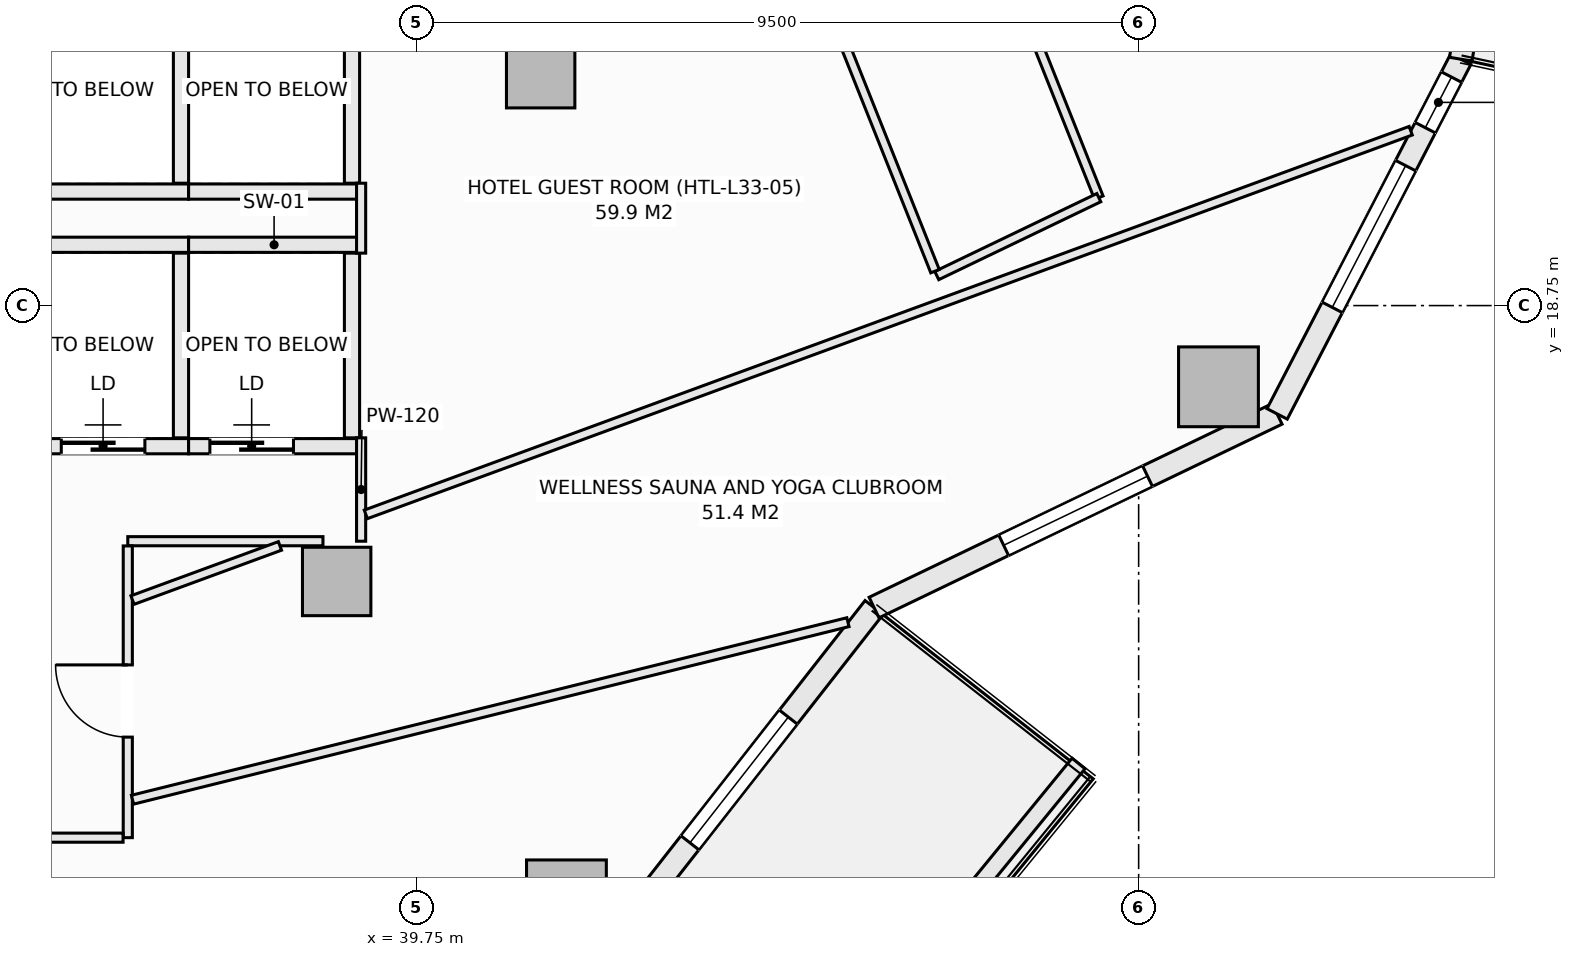
"""IFC4 building model, lengths in metres.
Left out: names, types, materials, properties, quantities, classifications, styles, units other than length and angle.
Written with IfcOpenShell. Run it as: python <this file> out.ifc"""

import sys

from ifc_helpers import new_model, si_unit, direction, frame, frame_2d, origin, origin_2d, place, context, subcontext, project, spatial, rectangle, extrude, element, fill, save


model = new_model("IFC4")
c1 = context("Model", 3, precision=1e-05, world=origin(), true_north=direction((0.0, 1.0)))
c2 = subcontext(c1, "Body", "Model", "MODEL_VIEW")
j1 = project(units=[si_unit("LENGTHUNIT", "METRE"), si_unit("PLANEANGLEUNIT", "RADIAN")], contexts=[c1])
p1 = place(None, origin())
s1 = spatial("IfcSite", under=j1, at=p1, CompositionType="ELEMENT")
p2 = place(p1, origin())
s2 = spatial("IfcBuilding", under=s1, at=p2, CompositionType="ELEMENT")
p3 = place(p2, frame((0.0, 0.0, 132.5)))
s3 = spatial("IfcBuildingStorey", under=s2, at=p3, CompositionType="ELEMENT", Elevation=132.5)
for number, where, z_axis, x_axis in (
    (1, (41.721, 10.932, -0.27), (0.0, 0.0, 1.0), (1.0, 0.0, 0.0)),
    (2, (50.3, 17.681, -0.27), (0.0, 0.0, 1.0), (1.0, 0.0, 0.0)),
):
    element("IfcColumn", number, at=place(p3, frame(where, z_axis=z_axis, x_axis=x_axis)), inside=s3, PredefinedType="COLUMN", context=c2, shape_type="SweptSolid", body=[
        extrude(rectangle(XDim=1.05, YDim=1.05, at=origin_2d()), origin(), (0.0, 0.0, 1.0), 3.4),
    ])
for number, where, z_axis, x_axis in (
    (3, (38.698, 15.121, -0.27), (0.0, 0.0, 1.0), (1.0, 0.0, 0.0)),
    (4, (41.382, 21.801, -0.27), (0.0, 0.0, 1.0), (1.0, 0.0, 0.0)),
):
    element("IfcColumn", number, at=place(p3, frame(where, z_axis=z_axis, x_axis=x_axis)), inside=s3, PredefinedType="COLUMN", context=c2, shape_type="SweptSolid", body=[
        extrude(rectangle(XDim=0.9, YDim=0.9, at=origin_2d()), origin(), (0.0, 0.0, 1.0), 3.4),
    ])
p4 = place(p3, frame((42.219, 10.242, 0.0), z_axis=(0.0, 0.0, 1.0), x_axis=(0.616435134162, 0.787405693001, 0.0)))
e5 = element("IfcWall", 5, at=p4, inside=s3, PredefinedType="SOLIDWALL", context=c2, shape_type="SweptSolid", body=[
    extrude(rectangle(XDim=5.759, YDim=0.3, at=frame_2d((2.879, 0.0))), origin(), (0.0, 0.0, 1.0), 2.653),
])
p5 = place(p4, frame((1.829, 0.0, 0.74)))
e6 = element("IfcOpeningElement", 6, at=p5, cuts=e5, PredefinedType="OPENING", context=c2, shape_type="SweptSolid", body=[
    extrude(rectangle(XDim=2.1, YDim=1.7, at=frame_2d((1.05, 0.85))), frame((0.0, 0.16, 0.0), z_axis=(0.0, -1.0, 0.0), x_axis=(1.0, 0.0, 0.0)), (0.0, 0.0, 1.0), 0.32),
])
p6 = place(p3, frame((45.769, 14.777, 0.0), z_axis=(0.0, 0.0, 1.0), x_axis=(0.901370184739, 0.433049408339, 0.0)))
e7 = element("IfcWall", 7, at=p6, inside=s3, PredefinedType="SOLIDWALL", context=c2, shape_type="SweptSolid", body=[
    extrude(rectangle(XDim=5.884, YDim=0.3, at=frame_2d((2.942, 0.0))), origin(), (0.0, 0.0, 1.0), 2.653),
])
p7 = place(p6, frame((1.892, 0.0, 0.74)))
e8 = element("IfcOpeningElement", 8, at=p7, cuts=e7, PredefinedType="OPENING", context=c2, shape_type="SweptSolid", body=[
    extrude(rectangle(XDim=2.1, YDim=1.7, at=frame_2d((1.05, 0.85))), frame((0.0, 0.16, 0.0), z_axis=(0.0, -1.0, 0.0), x_axis=(1.0, 0.0, 0.0)), (0.0, 0.0, 1.0), 0.32),
])
p8 = place(p3, frame((51.072, 17.325, 0.0), z_axis=(0.0, 0.0, 1.0), x_axis=(0.459767899643, 0.888039119892, 0.0)))
e9 = element("IfcWall", 9, at=p8, inside=s3, PredefinedType="SOLIDWALL", context=c2, shape_type="SweptSolid", body=[
    extrude(rectangle(XDim=5.255, YDim=0.3, at=frame_2d((2.628, 0.0))), origin(), (0.0, 0.0, 1.0), 2.653),
])
p9 = place(p8, frame((1.578, 0.0, 0.74)))
e10 = element("IfcOpeningElement", 10, at=p9, cuts=e9, PredefinedType="OPENING", context=c2, shape_type="SweptSolid", body=[
    extrude(rectangle(XDim=2.1, YDim=1.7, at=frame_2d((1.05, 0.85))), frame((0.0, 0.16, 0.0), z_axis=(0.0, -1.0, 0.0), x_axis=(1.0, 0.0, 0.0)), (0.0, 0.0, 1.0), 0.32),
])
p10 = place(p8, frame((4.24, 0.0, 0.72)))
e11 = element("IfcOpeningElement", 11, at=p10, cuts=e9, PredefinedType="OPENING", context=c2, shape_type="SweptSolid", body=[
    extrude(rectangle(XDim=0.75, YDim=1.65, at=frame_2d((0.375, 0.825))), frame((0.0, 0.16, 0.0), z_axis=(0.0, -1.0, 0.0), x_axis=(1.0, 0.0, 0.0)), (0.0, 0.0, 1.0), 0.32),
])
p11 = place(p3, frame((53.488, 21.992, 0.0), z_axis=(0.0, 0.0, 1.0), x_axis=(0.162393944769, 0.986726003864, 0.0)))
e12 = element("IfcWall", 12, at=p11, inside=s3, PredefinedType="SOLIDWALL", context=c2, shape_type="SweptSolid", body=[
    extrude(rectangle(XDim=5.075, YDim=0.3, at=frame_2d((2.538, 0.0))), origin(), (0.0, 0.0, 1.0), 2.653),
])
p12 = place(p11, frame((2.78, 0.0, 0.72)))
e13 = element("IfcOpeningElement", 13, at=p12, cuts=e12, PredefinedType="OPENING", context=c2, shape_type="SweptSolid", body=[
    extrude(rectangle(XDim=1.2, YDim=1.65, at=frame_2d((0.6, 0.825))), frame((0.0, 0.16, 0.0), z_axis=(0.0, -1.0, 0.0), x_axis=(1.0, 0.0, 0.0)), (0.0, 0.0, 1.0), 0.32),
])
p13 = place(p3, frame((44.167, 7.477, 0.0), z_axis=(0.0, 0.0, 1.0), x_axis=(0.633002467947, 0.77414977593, 0.0)))
e14 = element("IfcWall", 14, at=p13, inside=s3, PredefinedType="PARAPET", context=c2, shape_type="SweptSolid", body=[
    extrude(rectangle(XDim=6.78, YDim=0.22, at=frame_2d((3.39, 0.0))), origin(), (0.0, 0.0, 1.0), 0.52),
])
p14 = place(p3, frame((34.5, 19.55, 0.0), z_axis=(0.0, 0.0, 1.0), x_axis=(1.0, 0.0, 0.0)))
e15 = element("IfcWall", 15, at=p14, inside=s3, PredefinedType="SOLIDWALL", context=c2, shape_type="SweptSolid", body=[
    extrude(rectangle(XDim=2.25, YDim=0.2, at=frame_2d((1.125, 0.0))), origin(), (0.0, 0.0, 1.0), 3.13),
])
p15 = place(p3, frame((34.5, 16.9, 0.0), z_axis=(0.0, 0.0, 1.0), x_axis=(1.0, 0.0, 0.0)))
e16 = element("IfcWall", 16, at=p15, inside=s3, PredefinedType="SOLIDWALL", context=c2, shape_type="SweptSolid", body=[
    extrude(rectangle(XDim=2.25, YDim=0.2, at=frame_2d((1.125, 0.0))), origin(), (0.0, 0.0, 1.0), 3.13),
])
p16 = place(p15, frame((0.575, 0.0, 0.0)))
e17 = element("IfcOpeningElement", 17, at=p16, cuts=e16, PredefinedType="OPENING", context=c2, shape_type="SweptSolid", body=[
    extrude(rectangle(XDim=1.1, YDim=2.2, at=frame_2d((0.55, 1.1))), frame((0.0, 0.11, 0.0), z_axis=(0.0, -1.0, 0.0), x_axis=(1.0, 0.0, 0.0)), (0.0, 0.0, 1.0), 0.22),
])
p17 = place(p3, frame((36.65, 17.01, 0.0), z_axis=(0.0, 0.0, 1.0), x_axis=(0.0, 1.0, 0.0)))
e18 = element("IfcWall", 18, at=p17, inside=s3, PredefinedType="SOLIDWALL", context=c2, shape_type="SweptSolid", body=[
    extrude(rectangle(XDim=2.43, YDim=0.2, at=frame_2d((1.215, 0.0))), origin(), (0.0, 0.0, 1.0), 3.13),
])
p18 = place(p3, frame((36.75, 19.55, 0.0), z_axis=(0.0, 0.0, 1.0), x_axis=(1.0, 0.0, 0.0)))
e19 = element("IfcWall", 19, at=p18, inside=s3, PredefinedType="SOLIDWALL", context=c2, shape_type="SweptSolid", body=[
    extrude(rectangle(XDim=2.25, YDim=0.2, at=frame_2d((1.125, 0.0))), origin(), (0.0, 0.0, 1.0), 3.13),
])
p19 = place(p3, frame((36.75, 16.9, 0.0), z_axis=(0.0, 0.0, 1.0), x_axis=(1.0, 0.0, 0.0)))
e20 = element("IfcWall", 20, at=p19, inside=s3, PredefinedType="SOLIDWALL", context=c2, shape_type="SweptSolid", body=[
    extrude(rectangle(XDim=2.25, YDim=0.2, at=frame_2d((1.125, 0.0))), origin(), (0.0, 0.0, 1.0), 3.13),
])
p20 = place(p19, frame((0.28, 0.0, 0.0)))
e21 = element("IfcOpeningElement", 21, at=p20, cuts=e20, PredefinedType="OPENING", context=c2, shape_type="SweptSolid", body=[
    extrude(rectangle(XDim=1.1, YDim=2.2, at=frame_2d((0.55, 1.1))), frame((0.0, 0.11, 0.0), z_axis=(0.0, -1.0, 0.0), x_axis=(1.0, 0.0, 0.0)), (0.0, 0.0, 1.0), 0.22),
])
p21 = place(p3, frame((38.9, 17.01, 0.0), z_axis=(0.0, 0.0, 1.0), x_axis=(0.0, 1.0, 0.0)))
e22 = element("IfcWall", 22, at=p21, inside=s3, PredefinedType="SOLIDWALL", context=c2, shape_type="SweptSolid", body=[
    extrude(rectangle(XDim=2.43, YDim=0.2, at=frame_2d((1.215, 0.0))), origin(), (0.0, 0.0, 1.0), 3.13),
])
p22 = place(p3, frame((34.5, 20.25, 0.0), z_axis=(0.0, 0.0, 1.0), x_axis=(1.0, 0.0, 0.0)))
e23 = element("IfcWall", 23, at=p22, inside=s3, PredefinedType="SOLIDWALL", context=c2, shape_type="SweptSolid", body=[
    extrude(rectangle(XDim=2.25, YDim=0.2, at=frame_2d((1.125, 0.0))), origin(), (0.0, 0.0, 1.0), 3.13),
])
p23 = place(p3, frame((36.65, 20.36, 0.0), z_axis=(0.0, 0.0, 1.0), x_axis=(0.0, 1.0, 0.0)))
e24 = element("IfcWall", 24, at=p23, inside=s3, PredefinedType="SOLIDWALL", context=c2, shape_type="SweptSolid", body=[
    extrude(rectangle(XDim=2.43, YDim=0.2, at=frame_2d((1.215, 0.0))), origin(), (0.0, 0.0, 1.0), 3.13),
])
p24 = place(p3, frame((36.75, 20.25, 0.0), z_axis=(0.0, 0.0, 1.0), x_axis=(1.0, 0.0, 0.0)))
e25 = element("IfcWall", 25, at=p24, inside=s3, PredefinedType="SOLIDWALL", context=c2, shape_type="SweptSolid", body=[
    extrude(rectangle(XDim=2.25, YDim=0.2, at=frame_2d((1.125, 0.0))), origin(), (0.0, 0.0, 1.0), 3.13),
])
p25 = place(p3, frame((38.9, 20.36, 0.0), z_axis=(0.0, 0.0, 1.0), x_axis=(0.0, 1.0, 0.0)))
e26 = element("IfcWall", 26, at=p25, inside=s3, PredefinedType="SOLIDWALL", context=c2, shape_type="SweptSolid", body=[
    extrude(rectangle(XDim=2.43, YDim=0.2, at=frame_2d((1.215, 0.0))), origin(), (0.0, 0.0, 1.0), 3.13),
])
p26 = place(p3, frame((39.02, 15.65, 0.0), z_axis=(0.0, 0.0, 1.0), x_axis=(0.0, 1.0, 0.0)))
e27 = element("IfcWall", 27, at=p26, inside=s3, PredefinedType="PARTITIONING", context=c2, shape_type="SweptSolid", body=[
    extrude(rectangle(XDim=1.36, YDim=0.12, at=frame_2d((0.68, 0.0))), origin(), (0.0, 0.0, 1.0), 2.505),
])
p27 = place(p3, frame((39.02, 19.44, 0.0), z_axis=(0.0, 0.0, 1.0), x_axis=(0.0, 1.0, 0.0)))
e28 = element("IfcWall", 28, at=p27, inside=s3, PredefinedType="PARTITIONING", context=c2, shape_type="SweptSolid", body=[
    extrude(rectangle(XDim=0.92, YDim=0.12, at=frame_2d((0.46, 0.0))), origin(), (0.0, 0.0, 1.0), 3.13),
])
p28 = place(p3, frame((35.95, 15.65, 0.0), z_axis=(0.0, 0.0, 1.0), x_axis=(1.0, 0.0, 0.0)))
e29 = element("IfcWall", 29, at=p28, inside=s3, PredefinedType="PARTITIONING", context=c2, shape_type="SweptSolid", body=[
    extrude(rectangle(XDim=2.568, YDim=0.12, at=frame_2d((1.284, 0.0))), origin(), (0.0, 0.0, 1.0), 3.13),
])
p29 = place(p3, frame((35.95, 11.75, 0.0), z_axis=(0.0, 0.0, 1.0), x_axis=(0.0, 1.0, 0.0)))
e30 = element("IfcWall", 30, at=p29, inside=s3, PredefinedType="PARTITIONING", context=c2, shape_type="SweptSolid", body=[
    extrude(rectangle(XDim=3.838, YDim=0.12, at=frame_2d((1.919, 0.0))), origin(), (0.0, 0.0, 1.0), 3.13),
])
p30 = place(p29, frame((1.323, 0.0, 0.0)))
e31 = element("IfcOpeningElement", 31, at=p30, cuts=e30, PredefinedType="OPENING", context=c2, shape_type="SweptSolid", body=[
    extrude(rectangle(XDim=0.95, YDim=2.1, at=frame_2d((0.475, 1.05))), frame((0.0, 0.07, 0.0), z_axis=(0.0, -1.0, 0.0), x_axis=(1.0, 0.0, 0.0)), (0.0, 0.0, 1.0), 0.14),
])
p31 = place(p3, frame((27.227, 11.75, 0.0), z_axis=(0.0, 0.0, 1.0), x_axis=(1.0, 0.0, 0.0)))
e32 = element("IfcWall", 32, at=p31, inside=s3, PredefinedType="PARTITIONING", context=c2, shape_type="SweptSolid", body=[
    extrude(rectangle(XDim=8.661, YDim=0.12, at=frame_2d((4.331, 0.0))), origin(), (0.0, 0.0, 1.0), 3.13),
])
p32 = place(p31, frame((6.659, 0.0, 0.0)))
e33 = element("IfcOpeningElement", 33, at=p32, cuts=e32, PredefinedType="OPENING", context=c2, shape_type="SweptSolid", body=[
    extrude(rectangle(XDim=0.95, YDim=2.1, at=frame_2d((0.475, 1.05))), frame((0.0, 0.07, 0.0), z_axis=(0.0, -1.0, 0.0), x_axis=(1.0, 0.0, 0.0)), (0.0, 0.0, 1.0), 0.14),
])
p33 = place(p3, frame((46.946, 24.637, 0.0), z_axis=(0.0, 0.0, 1.0), x_axis=(0.370173596818, -0.928962597858, 0.0)))
e34 = element("IfcWall", 34, at=p33, inside=s3, PredefinedType="PARTITIONING", context=c2, shape_type="SweptSolid", body=[
    extrude(rectangle(XDim=4.809, YDim=0.12, at=frame_2d((2.404, 0.0))), origin(), (0.0, 0.0, 1.0), 3.13),
])
p34 = place(p3, frame((46.594, 19.145, 0.0), z_axis=(0.0, 0.0, 1.0), x_axis=(0.901274899261, 0.433247684312, 0.0)))
e35 = element("IfcWall", 35, at=p34, inside=s3, PredefinedType="PARTITIONING", context=c2, shape_type="SweptSolid", body=[
    extrude(rectangle(XDim=2.366, YDim=0.12, at=frame_2d((1.183, 0.0))), origin(), (0.0, 0.0, 1.0), 3.13),
])
p35 = place(p3, frame((45.05, 23.02, 0.0), z_axis=(0.0, 0.0, 1.0), x_axis=(0.370140626192, -0.928975735335, 0.0)))
e36 = element("IfcWall", 36, at=p35, inside=s3, PredefinedType="PARTITIONING", context=c2, shape_type="SweptSolid", body=[
    extrude(rectangle(XDim=4.109, YDim=0.12, at=frame_2d((2.055, 0.0))), origin(), (0.0, 0.0, 1.0), 3.13),
])
p36 = place(p3, frame((36.012, 14.876, 0.0), z_axis=(0.0, 0.0, 1.0), x_axis=(0.938757901669, 0.344577425339, 0.0)))
e37 = element("IfcWall", 37, at=p36, inside=s3, PredefinedType="PARTITIONING", context=c2, shape_type="SweptSolid", body=[
    extrude(rectangle(XDim=2.067, YDim=0.12, at=frame_2d((1.033, 0.0))), origin(), (0.0, 0.0, 1.0), 2.505),
])
p37 = place(p3, frame((39.082, 16.003, 0.0), z_axis=(0.0, 0.0, 1.0), x_axis=(0.93872535699, 0.344666076288, 0.0)))
e38 = element("IfcWall", 38, at=p37, inside=s3, PredefinedType="PARTITIONING", context=c2, shape_type="SweptSolid", body=[
    extrude(rectangle(XDim=14.645, YDim=0.12, at=frame_2d((7.323, 0.0))), origin(), (0.0, 0.0, 1.0), 3.13),
])
p38 = place(p3, frame((36.012, 12.249, 0.0), z_axis=(0.0, 0.0, 1.0), x_axis=(0.970568919411, 0.24082353015, 0.0)))
e39 = element("IfcWall", 39, at=p38, inside=s3, PredefinedType="PARTITIONING", context=c2, shape_type="SweptSolid", body=[
    extrude(rectangle(XDim=9.699, YDim=0.12, at=frame_2d((4.849, 0.0))), origin(), (0.0, 0.0, 1.0), 3.13),
])
p39 = place(p5, origin())
e40 = element("IfcWindow", 40, at=p39, inside=s3, PartitioningType="SINGLE_PANEL", PredefinedType="WINDOW", context=c2, shape_type="SweptSolid", body=[
    extrude(rectangle(XDim=2.1, YDim=1.7, at=frame_2d((1.05, 0.85))), frame((0.0, 0.03, 0.0), z_axis=(0.0, -1.0, 0.0), x_axis=(1.0, 0.0, 0.0)), (0.0, 0.0, 1.0), 0.06),
])
fill(e6, e40)
p40 = place(p7, origin())
e41 = element("IfcWindow", 41, at=p40, inside=s3, PartitioningType="SINGLE_PANEL", PredefinedType="WINDOW", context=c2, shape_type="SweptSolid", body=[
    extrude(rectangle(XDim=2.1, YDim=1.7, at=frame_2d((1.05, 0.85))), frame((0.0, 0.03, 0.0), z_axis=(0.0, -1.0, 0.0), x_axis=(1.0, 0.0, 0.0)), (0.0, 0.0, 1.0), 0.06),
])
fill(e8, e41)
p41 = place(p9, origin())
e42 = element("IfcWindow", 42, at=p41, inside=s3, PartitioningType="SINGLE_PANEL", PredefinedType="WINDOW", context=c2, shape_type="SweptSolid", body=[
    extrude(rectangle(XDim=2.1, YDim=1.7, at=frame_2d((1.05, 0.85))), frame((0.0, 0.03, 0.0), z_axis=(0.0, -1.0, 0.0), x_axis=(1.0, 0.0, 0.0)), (0.0, 0.0, 1.0), 0.06),
])
fill(e10, e42)
p42 = place(p16, origin())
e43 = element("IfcDoor", 43, at=p42, inside=s3, OperationType="SLIDING_TO_LEFT", PredefinedType="DOOR", context=c2, shape_type="SweptSolid", body=[
    extrude(rectangle(XDim=1.1, YDim=2.2, at=frame_2d((0.55, 1.1))), frame((0.0, 0.025, 0.0), z_axis=(0.0, -1.0, 0.0), x_axis=(1.0, 0.0, 0.0)), (0.0, 0.0, 1.0), 0.05),
])
fill(e17, e43)
p43 = place(p20, origin())
e44 = element("IfcDoor", 44, at=p43, inside=s3, OperationType="SLIDING_TO_LEFT", PredefinedType="DOOR", context=c2, shape_type="SweptSolid", body=[
    extrude(rectangle(XDim=1.1, YDim=2.2, at=frame_2d((0.55, 1.1))), frame((0.0, 0.025, 0.0), z_axis=(0.0, -1.0, 0.0), x_axis=(1.0, 0.0, 0.0)), (0.0, 0.0, 1.0), 0.05),
])
fill(e21, e44)
p44 = place(p30, origin())
e45 = element("IfcDoor", 45, at=p44, inside=s3, OperationType="SINGLE_SWING_RIGHT", PredefinedType="DOOR", context=c2, shape_type="SweptSolid", body=[
    extrude(rectangle(XDim=0.95, YDim=2.1, at=frame_2d((0.475, 1.05))), frame((0.0, 0.025, 0.0), z_axis=(0.0, -1.0, 0.0), x_axis=(1.0, 0.0, 0.0)), (0.0, 0.0, 1.0), 0.05),
])
fill(e31, e45)
p45 = place(p10, origin())
e46 = element("IfcWindow", 46, at=p45, inside=s3, PartitioningType="SINGLE_PANEL", PredefinedType="WINDOW", context=c2, shape_type="SweptSolid", body=[
    extrude(rectangle(XDim=0.75, YDim=1.65, at=frame_2d((0.375, 0.825))), frame((0.0, 0.03, 0.0), z_axis=(0.0, -1.0, 0.0), x_axis=(1.0, 0.0, 0.0)), (0.0, 0.0, 1.0), 0.06),
])
fill(e11, e46)
save(model, sys.argv[1])
